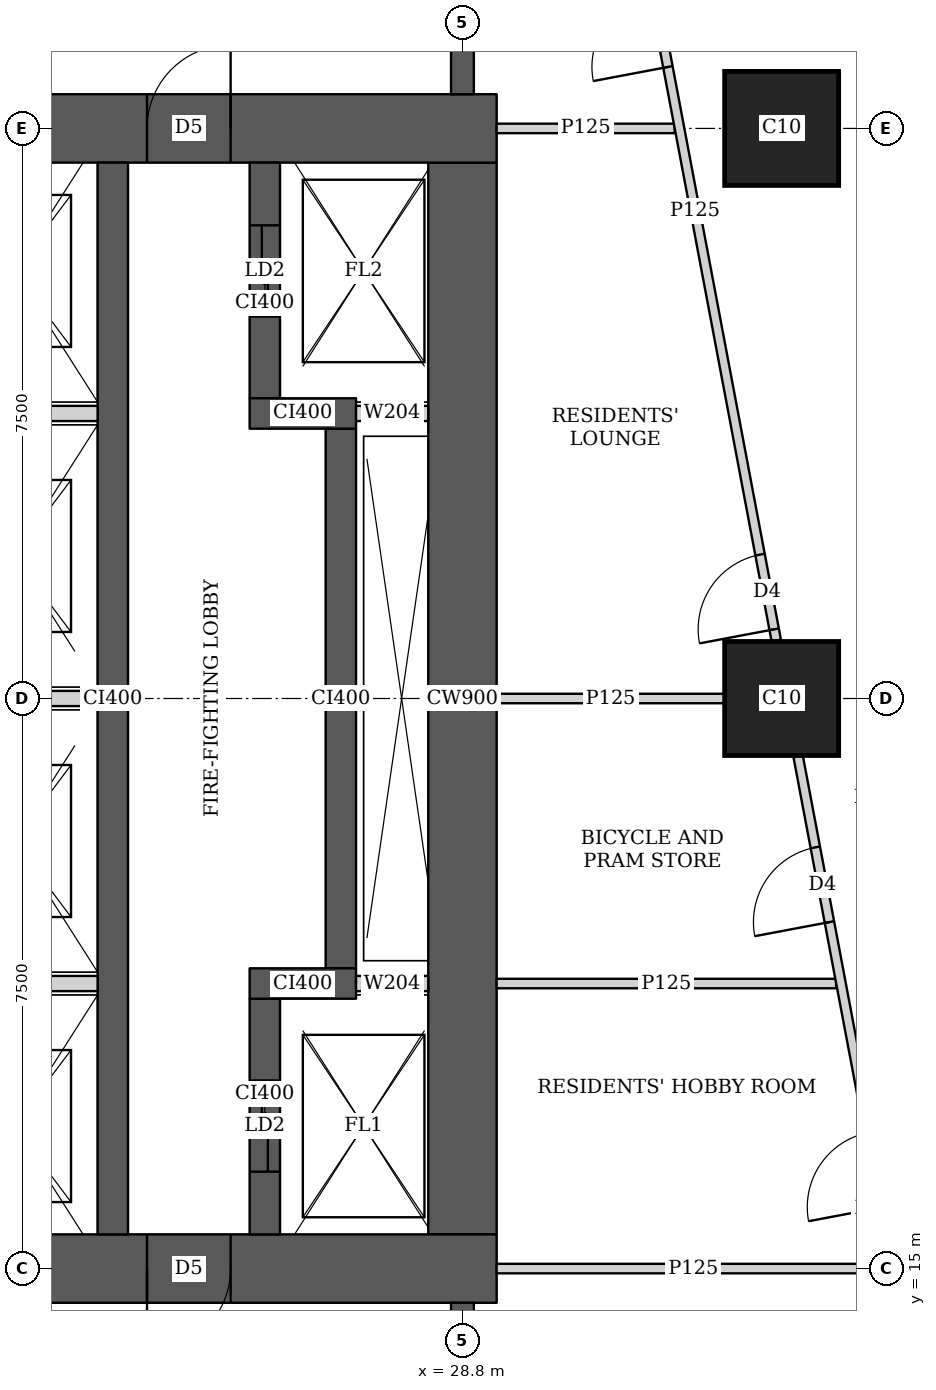
"""IFC4 building model, lengths in metres.
Left out: names, types, materials, properties, quantities, classifications, styles, units other than length and angle.
Written with IfcOpenShell. Run it as: python <this file> out.ifc"""

import sys

from ifc_helpers import new_model, si_unit, direction, frame, frame_2d, origin, origin_2d, place, context, subcontext, project, spatial, rectangle, extrude, element, fill, save


model = new_model("IFC4")
c1 = context("Model", 3, precision=1e-05, world=origin(), true_north=direction((0.0, 1.0)))
c2 = subcontext(c1, "Body", "Model", "MODEL_VIEW")
j1 = project(units=[si_unit("LENGTHUNIT", "METRE"), si_unit("PLANEANGLEUNIT", "RADIAN")], contexts=[c1])
p1 = place(None, origin())
s1 = spatial("IfcSite", under=j1, at=p1, CompositionType="ELEMENT")
p2 = place(p1, origin())
s2 = spatial("IfcBuilding", under=s1, at=p2, CompositionType="ELEMENT")
p3 = place(p2, frame((0.0, 0.0, 135.8)))
s3 = spatial("IfcBuildingStorey", under=s2, at=p3, CompositionType="ELEMENT", Elevation=135.8)
for number, where, z_axis, x_axis in (
    (1, (33.0, 22.5, 0.0), (0.0, 0.0, 1.0), (1.0, 0.0, 0.0)),
    (2, (33.0, 30.0, 0.0), (0.0, 0.0, 1.0), (1.0, 0.0, 0.0)),
):
    element("IfcColumn", number, at=place(p3, frame(where, z_axis=z_axis, x_axis=x_axis)), inside=s3, PredefinedType="COLUMN", context=c2, shape_type="SweptSolid", body=[
        extrude(rectangle(XDim=1.5, YDim=1.5, at=origin_2d()), origin(), (0.0, 0.0, 1.0), 3.75),
    ])
p4 = place(p3, frame((13.95, 15.0, 0.0), z_axis=(0.0, 0.0, 1.0), x_axis=(1.0, 0.0, 0.0)))
e3 = element("IfcWall", 3, at=p4, inside=s3, PredefinedType="SHEAR", context=c2, shape_type="SweptSolid", body=[
    extrude(rectangle(XDim=15.3, YDim=0.9, at=frame_2d((7.65, 0.0))), origin(), (0.0, 0.0, 1.0), 3.75),
])
p5 = place(p4, frame((4.45, 0.0, 0.0)))
e4 = element("IfcOpeningElement", 4, at=p5, cuts=e3, PredefinedType="OPENING", context=c2, shape_type="SweptSolid", body=[
    extrude(rectangle(XDim=1.8, YDim=2.1, at=frame_2d((0.9, 1.05))), frame((0.0, 0.46, 0.0), z_axis=(0.0, -1.0, 0.0), x_axis=(1.0, 0.0, 0.0)), (0.0, 0.0, 1.0), 0.92),
])
p6 = place(p4, frame((10.7, 0.0, 0.0)))
e5 = element("IfcOpeningElement", 5, at=p6, cuts=e3, PredefinedType="OPENING", context=c2, shape_type="SweptSolid", body=[
    extrude(rectangle(XDim=1.1, YDim=2.1, at=frame_2d((0.55, 1.05))), frame((0.0, 0.46, 0.0), z_axis=(0.0, -1.0, 0.0), x_axis=(1.0, 0.0, 0.0)), (0.0, 0.0, 1.0), 0.92),
])
p7 = place(p3, frame((13.95, 30.0, 0.0), z_axis=(0.0, 0.0, 1.0), x_axis=(1.0, 0.0, 0.0)))
e6 = element("IfcWall", 6, at=p7, inside=s3, PredefinedType="SHEAR", context=c2, shape_type="SweptSolid", body=[
    extrude(rectangle(XDim=15.3, YDim=0.9, at=frame_2d((7.65, 0.0))), origin(), (0.0, 0.0, 1.0), 3.75),
])
p8 = place(p7, frame((4.45, 0.0, 0.0)))
e7 = element("IfcOpeningElement", 7, at=p8, cuts=e6, PredefinedType="OPENING", context=c2, shape_type="SweptSolid", body=[
    extrude(rectangle(XDim=1.8, YDim=2.1, at=frame_2d((0.9, 1.05))), frame((0.0, 0.46, 0.0), z_axis=(0.0, -1.0, 0.0), x_axis=(1.0, 0.0, 0.0)), (0.0, 0.0, 1.0), 0.92),
])
p9 = place(p7, frame((10.7, 0.0, 0.0)))
e8 = element("IfcOpeningElement", 8, at=p9, cuts=e6, PredefinedType="OPENING", context=c2, shape_type="SweptSolid", body=[
    extrude(rectangle(XDim=1.1, YDim=2.1, at=frame_2d((0.55, 1.05))), frame((0.0, 0.46, 0.0), z_axis=(0.0, -1.0, 0.0), x_axis=(1.0, 0.0, 0.0)), (0.0, 0.0, 1.0), 0.92),
])
p10 = place(p3, frame((28.8, 15.45, 0.0), z_axis=(0.0, 0.0, 1.0), x_axis=(0.0, 1.0, 0.0)))
e9 = element("IfcWall", 9, at=p10, inside=s3, PredefinedType="SHEAR", context=c2, shape_type="SweptSolid", body=[
    extrude(rectangle(XDim=14.1, YDim=0.9, at=frame_2d((7.05, 0.0))), origin(), (0.0, 0.0, 1.0), 3.75),
])
p11 = place(p3, frame((24.2, 15.45, 0.0), z_axis=(0.0, 0.0, 1.0), x_axis=(0.0, 1.0, 0.0)))
e10 = element("IfcWall", 10, at=p11, inside=s3, PredefinedType="SHEAR", context=c2, shape_type="SweptSolid", body=[
    extrude(rectangle(XDim=14.1, YDim=0.4, at=frame_2d((7.05, 0.0))), origin(), (0.0, 0.0, 1.0), 3.75),
])
p12 = place(p3, frame((26.2, 15.45, 0.0), z_axis=(0.0, 0.0, 1.0), x_axis=(0.0, 1.0, 0.0)))
e11 = element("IfcWall", 11, at=p12, inside=s3, PredefinedType="SHEAR", context=c2, shape_type="SweptSolid", body=[
    extrude(rectangle(XDim=3.1, YDim=0.4, at=frame_2d((1.55, 0.0))), origin(), (0.0, 0.0, 1.0), 3.75),
])
p13 = place(p12, frame((0.825, 0.0, 0.0)))
e12 = element("IfcOpeningElement", 12, at=p13, cuts=e11, PredefinedType="OPENING", context=c2, shape_type="SweptSolid", body=[
    extrude(rectangle(XDim=1.2, YDim=2.1, at=frame_2d((0.6, 1.05))), frame((0.0, 0.21, 0.0), z_axis=(0.0, -1.0, 0.0), x_axis=(1.0, 0.0, 0.0)), (0.0, 0.0, 1.0), 0.42),
])
p14 = place(p3, frame((26.0, 18.75, 0.0), z_axis=(0.0, 0.0, 1.0), x_axis=(1.0, 0.0, 0.0)))
e13 = element("IfcWall", 13, at=p14, inside=s3, PredefinedType="SHEAR", context=c2, shape_type="SweptSolid", body=[
    extrude(rectangle(XDim=1.4, YDim=0.4, at=frame_2d((0.7, 0.0))), origin(), (0.0, 0.0, 1.0), 3.75),
])
p15 = place(p3, frame((27.2, 18.95, 0.0), z_axis=(0.0, 0.0, 1.0), x_axis=(0.0, 1.0, 0.0)))
e14 = element("IfcWall", 14, at=p15, inside=s3, PredefinedType="SHEAR", context=c2, shape_type="SweptSolid", body=[
    extrude(rectangle(XDim=7.1, YDim=0.4, at=frame_2d((3.55, 0.0))), origin(), (0.0, 0.0, 1.0), 3.75),
])
p16 = place(p3, frame((26.0, 26.25, 0.0), z_axis=(0.0, 0.0, 1.0), x_axis=(1.0, 0.0, 0.0)))
e15 = element("IfcWall", 15, at=p16, inside=s3, PredefinedType="SHEAR", context=c2, shape_type="SweptSolid", body=[
    extrude(rectangle(XDim=1.4, YDim=0.4, at=frame_2d((0.7, 0.0))), origin(), (0.0, 0.0, 1.0), 3.75),
])
p17 = place(p3, frame((26.2, 26.45, 0.0), z_axis=(0.0, 0.0, 1.0), x_axis=(0.0, 1.0, 0.0)))
e16 = element("IfcWall", 16, at=p17, inside=s3, PredefinedType="SHEAR", context=c2, shape_type="SweptSolid", body=[
    extrude(rectangle(XDim=3.1, YDim=0.4, at=frame_2d((1.55, 0.0))), origin(), (0.0, 0.0, 1.0), 3.75),
])
p18 = place(p17, frame((1.075, 0.0, 0.0)))
e17 = element("IfcOpeningElement", 17, at=p18, cuts=e16, PredefinedType="OPENING", context=c2, shape_type="SweptSolid", body=[
    extrude(rectangle(XDim=1.2, YDim=2.1, at=frame_2d((0.6, 1.05))), frame((0.0, 0.21, 0.0), z_axis=(0.0, -1.0, 0.0), x_axis=(1.0, 0.0, 0.0)), (0.0, 0.0, 1.0), 0.42),
])
for number, where, z_axis, x_axis in (
    (18, (28.8, 10.35, 0.0), (0.0, 0.0, 1.0), (0.0, 1.0, 0.0)),
    (19, (28.8, 30.45, 0.0), (0.0, 0.0, 1.0), (0.0, 1.0, 0.0)),
):
    element("IfcWall", number, at=place(p3, frame(where, z_axis=z_axis, x_axis=x_axis)), inside=s3, PredefinedType="SHEAR", context=c2, shape_type="SweptSolid", body=[
        extrude(rectangle(XDim=4.2, YDim=0.3, at=frame_2d((2.1, 0.0))), origin(), (0.0, 0.0, 1.0), 3.75),
    ])
p19 = place(p3, frame((33.623, 43.022, 0.0), z_axis=(0.0, 0.0, 1.0), x_axis=(0.185596841028, -0.98262597798, 0.0)))
e20 = element("IfcWall", 20, at=p19, inside=s3, PredefinedType="SOLIDWALL", context=c2, shape_type="SweptSolid", body=[
    extrude(rectangle(XDim=41.66, YDim=0.15, at=frame_2d((20.83, 0.0))), origin(), (0.0, 0.0, 1.0), 2.5),
])
p20 = place(p19, frame((20.242, 0.0, 0.0)))
e21 = element("IfcOpeningElement", 21, at=p20, cuts=e20, PredefinedType="OPENING", context=c2, shape_type="SweptSolid", body=[
    extrude(rectangle(XDim=1.0, YDim=2.1, at=frame_2d((0.5, 1.05))), frame((0.0, 0.085, 0.0), z_axis=(0.0, -1.0, 0.0), x_axis=(1.0, 0.0, 0.0)), (0.0, 0.0, 1.0), 0.17),
])
p21 = place(p19, frame((24.714, 0.0, 0.0)))
e22 = element("IfcOpeningElement", 22, at=p21, cuts=e20, PredefinedType="OPENING", context=c2, shape_type="SweptSolid", body=[
    extrude(rectangle(XDim=1.0, YDim=2.1, at=frame_2d((0.5, 1.05))), frame((0.0, 0.085, 0.0), z_axis=(0.0, -1.0, 0.0), x_axis=(1.0, 0.0, 0.0)), (0.0, 0.0, 1.0), 0.17),
])
p22 = place(p19, frame((31.206, 0.0, 0.0)))
e23 = element("IfcOpeningElement", 23, at=p22, cuts=e20, PredefinedType="OPENING", context=c2, shape_type="SweptSolid", body=[
    extrude(rectangle(XDim=1.0, YDim=2.1, at=frame_2d((0.5, 1.05))), frame((0.0, 0.085, 0.0), z_axis=(0.0, -1.0, 0.0), x_axis=(1.0, 0.0, 0.0)), (0.0, 0.0, 1.0), 0.17),
])
p23 = place(p3, frame((35.354, 10.424, 0.0), z_axis=(0.0, 0.0, 1.0), x_axis=(-0.185612234763, 0.982623070311, 0.0)))
e24 = element("IfcWall", 24, at=p23, inside=s3, PredefinedType="PARTITIONING", context=c2, shape_type="SweptSolid", body=[
    extrude(rectangle(XDim=11.513, YDim=0.125, at=frame_2d((5.756, 0.0))), origin(), (0.0, 0.0, 1.0), 3.5),
])
p24 = place(p23, frame((0.697, 0.0, 0.0)))
e25 = element("IfcOpeningElement", 25, at=p24, cuts=e24, PredefinedType="OPENING", context=c2, shape_type="SweptSolid", body=[
    extrude(rectangle(XDim=1.0, YDim=2.1, at=frame_2d((0.5, 1.05))), frame((0.0, 0.073, 0.0), z_axis=(0.0, -1.0, 0.0), x_axis=(1.0, 0.0, 0.0)), (0.0, 0.0, 1.0), 0.145),
])
p25 = place(p23, frame((5.48, 0.0, 0.0)))
e26 = element("IfcOpeningElement", 26, at=p25, cuts=e24, PredefinedType="OPENING", context=c2, shape_type="SweptSolid", body=[
    extrude(rectangle(XDim=1.0, YDim=2.1, at=frame_2d((0.5, 1.05))), frame((0.0, 0.073, 0.0), z_axis=(0.0, -1.0, 0.0), x_axis=(1.0, 0.0, 0.0)), (0.0, 0.0, 1.0), 0.145),
])
p26 = place(p23, frame((9.296, 0.0, 0.0)))
e27 = element("IfcOpeningElement", 27, at=p26, cuts=e24, PredefinedType="OPENING", context=c2, shape_type="SweptSolid", body=[
    extrude(rectangle(XDim=1.0, YDim=2.1, at=frame_2d((0.5, 1.05))), frame((0.0, 0.073, 0.0), z_axis=(0.0, -1.0, 0.0), x_axis=(1.0, 0.0, 0.0)), (0.0, 0.0, 1.0), 0.145),
])
p27 = place(p3, frame((32.929, 23.263, 0.0), z_axis=(0.0, 0.0, 1.0), x_axis=(-0.185612234763, 0.982623070311, 0.0)))
e28 = element("IfcWall", 28, at=p27, inside=s3, PredefinedType="PARTITIONING", context=c2, shape_type="SweptSolid", body=[
    extrude(rectangle(XDim=11.513, YDim=0.125, at=frame_2d((5.756, 0.0))), origin(), (0.0, 0.0, 1.0), 3.5),
])
p28 = place(p27, frame((0.15, 0.0, 0.0)))
e29 = element("IfcOpeningElement", 29, at=p28, cuts=e28, PredefinedType="OPENING", context=c2, shape_type="SweptSolid", body=[
    extrude(rectangle(XDim=1.0, YDim=2.1, at=frame_2d((0.5, 1.05))), frame((0.0, 0.073, 0.0), z_axis=(0.0, -1.0, 0.0), x_axis=(1.0, 0.0, 0.0)), (0.0, 0.0, 1.0), 0.145),
])
p29 = place(p27, frame((7.679, 0.0, 0.0)))
e30 = element("IfcOpeningElement", 30, at=p29, cuts=e28, PredefinedType="OPENING", context=c2, shape_type="SweptSolid", body=[
    extrude(rectangle(XDim=1.0, YDim=2.1, at=frame_2d((0.5, 1.05))), frame((0.0, 0.073, 0.0), z_axis=(0.0, -1.0, 0.0), x_axis=(1.0, 0.0, 0.0)), (0.0, 0.0, 1.0), 0.145),
])
p30 = place(p3, frame((29.25, 15.0, 0.0), z_axis=(0.0, 0.0, 1.0), x_axis=(1.0, 0.0, 0.0)))
e31 = element("IfcWall", 31, at=p30, inside=s3, PredefinedType="PARTITIONING", context=c2, shape_type="SweptSolid", body=[
    extrude(rectangle(XDim=5.176, YDim=0.125, at=frame_2d((2.588, 0.0))), origin(), (0.0, 0.0, 1.0), 3.5),
])
p31 = place(p3, frame((29.25, 18.75, 0.0), z_axis=(0.0, 0.0, 1.0), x_axis=(1.0, 0.0, 0.0)))
e32 = element("IfcWall", 32, at=p31, inside=s3, PredefinedType="PARTITIONING", context=c2, shape_type="SweptSolid", body=[
    extrude(rectangle(XDim=4.467, YDim=0.125, at=frame_2d((2.233, 0.0))), origin(), (0.0, 0.0, 1.0), 3.5),
])
p32 = place(p3, frame((29.25, 22.5, 0.0), z_axis=(0.0, 0.0, 1.0), x_axis=(1.0, 0.0, 0.0)))
e33 = element("IfcWall", 33, at=p32, inside=s3, PredefinedType="PARTITIONING", context=c2, shape_type="SweptSolid", body=[
    extrude(rectangle(XDim=2.999, YDim=0.125, at=frame_2d((1.5, 0.0))), origin(), (0.0, 0.0, 1.0), 3.5),
])
p33 = place(p3, frame((29.25, 30.0, 0.0), z_axis=(0.0, 0.0, 1.0), x_axis=(1.0, 0.0, 0.0)))
e34 = element("IfcWall", 34, at=p33, inside=s3, PredefinedType="PARTITIONING", context=c2, shape_type="SweptSolid", body=[
    extrude(rectangle(XDim=2.342, YDim=0.125, at=frame_2d((1.171, 0.0))), origin(), (0.0, 0.0, 1.0), 3.5),
])
for number, where, z_axis, x_axis in (
    (35, (21.8, 18.75, 0.0), (0.0, 0.0, 1.0), (1.0, 0.0, 0.0)),
    (36, (21.8, 22.5, 0.0), (0.0, 0.0, 1.0), (1.0, 0.0, 0.0)),
    (37, (21.8, 26.25, 0.0), (0.0, 0.0, 1.0), (1.0, 0.0, 0.0)),
):
    element("IfcWall", number, at=place(p3, frame(where, z_axis=z_axis, x_axis=x_axis)), inside=s3, PredefinedType="SOLIDWALL", context=c2, shape_type="SweptSolid", body=[
        extrude(rectangle(XDim=2.2, YDim=0.2, at=frame_2d((1.1, 0.0))), origin(), (0.0, 0.0, 1.0), 3.5),
    ])
for number, where, z_axis, x_axis in (
    (38, (27.4, 18.75, 0.0), (0.0, 0.0, 1.0), (1.0, 0.0, 0.0)),
    (39, (27.4, 26.25, 0.0), (0.0, 0.0, 1.0), (1.0, 0.0, 0.0)),
):
    element("IfcWall", number, at=place(p3, frame(where, z_axis=z_axis, x_axis=x_axis)), inside=s3, PredefinedType="SOLIDWALL", context=c2, shape_type="SweptSolid", body=[
        extrude(rectangle(XDim=0.95, YDim=0.2, at=frame_2d((0.475, 0.0))), origin(), (0.0, 0.0, 1.0), 3.5),
    ])
p34 = place(p26, origin())
e40 = element("IfcDoor", 40, at=p34, inside=s3, OperationType="SINGLE_SWING_LEFT", PredefinedType="DOOR", context=c2, shape_type="SweptSolid", body=[
    extrude(rectangle(XDim=1.0, YDim=2.1, at=frame_2d((0.5, 1.05))), frame((0.0, 0.025, 0.0), z_axis=(0.0, -1.0, 0.0), x_axis=(1.0, 0.0, 0.0)), (0.0, 0.0, 1.0), 0.05),
])
fill(e27, e40)
p35 = place(p28, origin())
e41 = element("IfcDoor", 41, at=p35, inside=s3, OperationType="SINGLE_SWING_LEFT", PredefinedType="DOOR", context=c2, shape_type="SweptSolid", body=[
    extrude(rectangle(XDim=1.0, YDim=2.1, at=frame_2d((0.5, 1.05))), frame((0.0, 0.025, 0.0), z_axis=(0.0, -1.0, 0.0), x_axis=(1.0, 0.0, 0.0)), (0.0, 0.0, 1.0), 0.05),
])
fill(e29, e41)
p36 = place(p29, origin())
e42 = element("IfcDoor", 42, at=p36, inside=s3, OperationType="SINGLE_SWING_LEFT", PredefinedType="DOOR", context=c2, shape_type="SweptSolid", body=[
    extrude(rectangle(XDim=1.0, YDim=2.1, at=frame_2d((0.5, 1.05))), frame((0.0, 0.025, 0.0), z_axis=(0.0, -1.0, 0.0), x_axis=(1.0, 0.0, 0.0)), (0.0, 0.0, 1.0), 0.05),
])
fill(e30, e42)
p37 = place(p6, origin())
e43 = element("IfcDoor", 43, at=p37, inside=s3, OperationType="SINGLE_SWING_RIGHT", PredefinedType="DOOR", context=c2, shape_type="SweptSolid", body=[
    extrude(rectangle(XDim=1.1, YDim=2.1, at=frame_2d((0.55, 1.05))), frame((0.0, 0.025, 0.0), z_axis=(0.0, -1.0, 0.0), x_axis=(1.0, 0.0, 0.0)), (0.0, 0.0, 1.0), 0.05),
])
fill(e5, e43)
p38 = place(p9, origin())
e44 = element("IfcDoor", 44, at=p38, inside=s3, OperationType="SINGLE_SWING_RIGHT", PredefinedType="DOOR", context=c2, shape_type="SweptSolid", body=[
    extrude(rectangle(XDim=1.1, YDim=2.1, at=frame_2d((0.55, 1.05))), frame((0.0, 0.025, 0.0), z_axis=(0.0, -1.0, 0.0), x_axis=(1.0, 0.0, 0.0)), (0.0, 0.0, 1.0), 0.05),
])
fill(e8, e44)
p39 = place(p13, origin())
e45 = element("IfcDoor", 45, at=p39, inside=s3, OperationType="DOUBLE_DOOR_SLIDING", PredefinedType="DOOR", context=c2, shape_type="SweptSolid", body=[
    extrude(rectangle(XDim=1.2, YDim=2.1, at=frame_2d((0.6, 1.05))), frame((0.0, 0.025, 0.0), z_axis=(0.0, -1.0, 0.0), x_axis=(1.0, 0.0, 0.0)), (0.0, 0.0, 1.0), 0.05),
])
fill(e12, e45)
p40 = place(p18, origin())
e46 = element("IfcDoor", 46, at=p40, inside=s3, OperationType="DOUBLE_DOOR_SLIDING", PredefinedType="DOOR", context=c2, shape_type="SweptSolid", body=[
    extrude(rectangle(XDim=1.2, YDim=2.1, at=frame_2d((0.6, 1.05))), frame((0.0, 0.025, 0.0), z_axis=(0.0, -1.0, 0.0), x_axis=(1.0, 0.0, 0.0)), (0.0, 0.0, 1.0), 0.05),
])
fill(e17, e46)
save(model, sys.argv[1])
